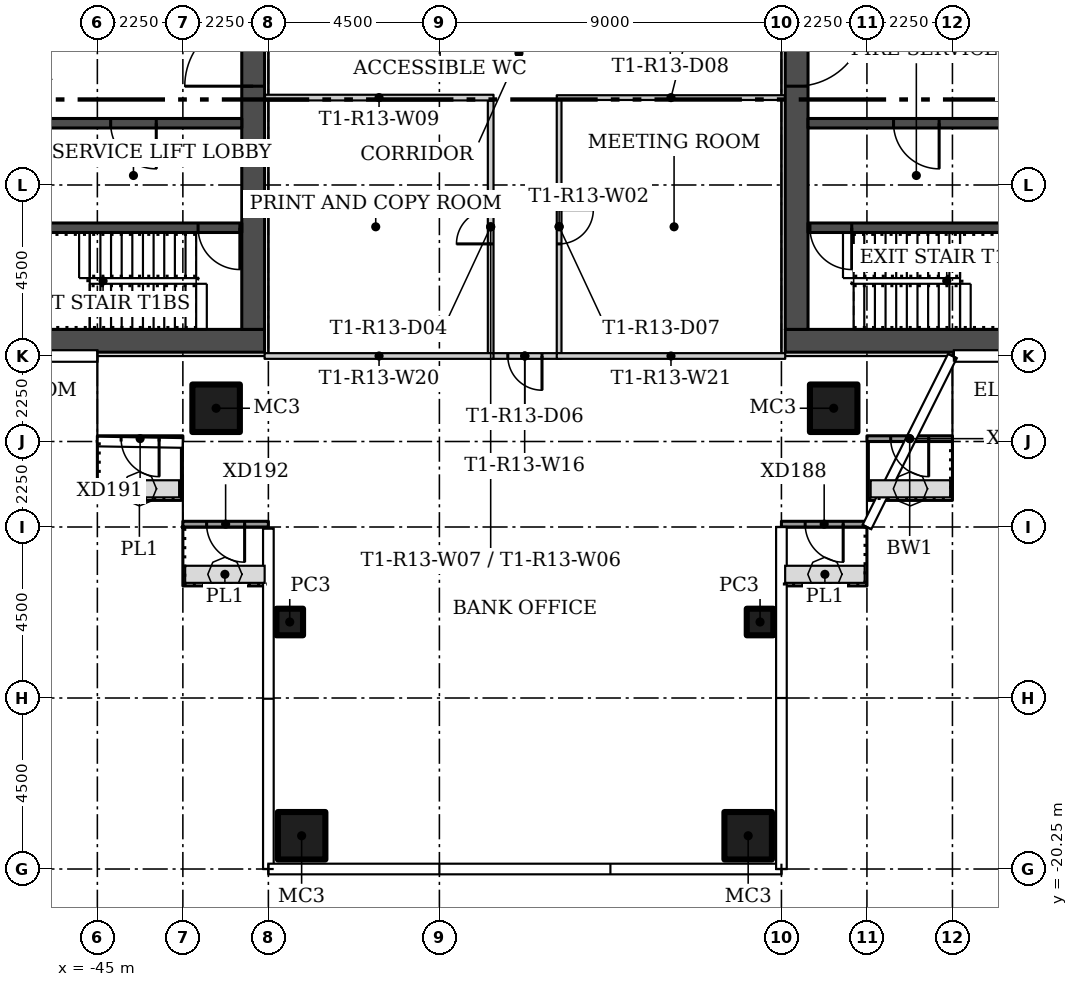
"""IFC4 building model, lengths in metres.
Left out: names, types, materials, properties, quantities, classifications, styles, units other than length and angle.
Written with IfcOpenShell. Run it as: python <this file> out.ifc"""

import sys

from ifc_helpers import new_model, si_unit, direction, frame, frame_2d, origin, origin_2d, place, context, subcontext, project, spatial, rectangle, hollow_rectangle, extrude, element, fill, save


model = new_model("IFC4")
c1 = context("Model", 3, precision=1e-05, world=origin(), true_north=direction((0.0, 1.0)))
c2 = subcontext(c1, "Body", "Model", "MODEL_VIEW")
j1 = project(units=[si_unit("LENGTHUNIT", "METRE"), si_unit("PLANEANGLEUNIT", "RADIAN")], contexts=[c1])
p1 = place(None, origin())
s1 = spatial("IfcSite", under=j1, at=p1, CompositionType="ELEMENT")
p2 = place(p1, origin())
s2 = spatial("IfcBuilding", under=s1, at=p2, CompositionType="ELEMENT")
p3 = place(p2, frame((0.0, 0.0, 124.8)))
s3 = spatial("IfcBuildingStorey", under=s2, at=p3, CompositionType="ELEMENT", Elevation=124.8)
for number, where in (
    (1, (-25.625, -8.125, 0.0)),
    (2, (-41.875, -8.125, 0.0)),
):
    element("IfcColumn", number, at=place(p3, frame(where)), inside=s3, PredefinedType="COLUMN", context=c2, shape_type="SweptSolid", body=[
        extrude(hollow_rectangle(XDim=1.25, YDim=1.25, WallThickness=0.05, at=origin_2d()), origin(), (0.0, 0.0, 1.0), 3.45),
    ])
p4 = place(p3, frame((-39.938, -13.75, 0.0)))
e3 = element("IfcColumn", 3, at=p4, inside=s3, PredefinedType="COLUMN", context=c2, shape_type="SweptSolid", body=[
    extrude(hollow_rectangle(XDim=0.7, YDim=0.7, WallThickness=0.025, at=origin_2d()), origin(), (0.0, 0.0, 1.0), 3.45),
])
p5 = place(p3, frame((-39.625, -19.375, 0.0)))
e4 = element("IfcColumn", 4, at=p5, inside=s3, PredefinedType="COLUMN", context=c2, shape_type="SweptSolid", body=[
    extrude(hollow_rectangle(XDim=1.25, YDim=1.25, WallThickness=0.05, at=origin_2d()), origin(), (0.0, 0.0, 1.0), 3.45),
])
p6 = place(p3, frame((-27.562, -13.75, 0.0)))
e5 = element("IfcColumn", 5, at=p6, inside=s3, PredefinedType="COLUMN", context=c2, shape_type="SweptSolid", body=[
    extrude(hollow_rectangle(XDim=0.7, YDim=0.7, WallThickness=0.025, at=origin_2d()), origin(), (0.0, 0.0, 1.0), 3.45),
])
p7 = place(p3, frame((-27.875, -19.375, 0.0)))
e6 = element("IfcColumn", 6, at=p7, inside=s3, PredefinedType="COLUMN", context=c2, shape_type="SweptSolid", body=[
    extrude(hollow_rectangle(XDim=1.25, YDim=1.25, WallThickness=0.05, at=origin_2d()), origin(), (0.0, 0.0, 1.0), 3.45),
])
p8 = place(p3, frame((-32.85, -0.013, 0.0), z_axis=(0.0, 0.0, 1.0), x_axis=(0.0, -1.0, 0.0)))
e7 = element("IfcWall", 7, at=p8, inside=s3, PredefinedType="PARTITIONING", context=c2, shape_type="SweptSolid", body=[
    extrude(rectangle(XDim=6.662, YDim=0.125, at=frame_2d((3.331, 0.0))), origin(), (0.0, 0.0, 1.0), 3.45),
])
p9 = place(p8, frame((2.887, 0.0, 0.0)))
e8 = element("IfcOpeningElement", 8, at=p9, cuts=e7, PredefinedType="OPENING", context=c2, shape_type="SweptSolid", body=[
    extrude(rectangle(XDim=0.9, YDim=2.1, at=frame_2d((0.45, 1.05))), frame((0.0, 0.073, 0.0), z_axis=(0.0, -1.0, 0.0), x_axis=(1.0, 0.0, 0.0)), (0.0, 0.0, 1.0), 0.145),
])
p10 = place(p3, frame((-26.9, 0.05, 0.0), z_axis=(0.0, 0.0, 1.0), x_axis=(-1.0, 0.0, 0.0)))
e9 = element("IfcWall", 9, at=p10, inside=s3, PredefinedType="PARTITIONING", context=c2, shape_type="SweptSolid", body=[
    extrude(rectangle(XDim=6.012, YDim=0.125, at=frame_2d((3.006, 0.0))), origin(), (0.0, 0.0, 1.0), 3.45),
])
p11 = place(p3, frame((-34.65, -6.675, 0.0), z_axis=(0.0, 0.0, 1.0), x_axis=(0.0, 1.0, 0.0)))
e10 = element("IfcWall", 10, at=p11, inside=s3, PredefinedType="PARTITIONING", context=c2, shape_type="SweptSolid", body=[
    extrude(rectangle(XDim=6.65, YDim=0.15, at=frame_2d((3.325, 0.0))), origin(), (0.0, 0.0, 1.0), 3.45),
])
p12 = place(p11, frame((2.875, 0.0, 0.0)))
e11 = element("IfcOpeningElement", 11, at=p12, cuts=e10, PredefinedType="OPENING", context=c2, shape_type="SweptSolid", body=[
    extrude(rectangle(XDim=0.9, YDim=2.1, at=frame_2d((0.45, 1.05))), frame((0.0, 0.085, 0.0), z_axis=(0.0, -1.0, 0.0), x_axis=(1.0, 0.0, 0.0)), (0.0, 0.0, 1.0), 0.17),
])
p13 = place(p3, frame((-34.575, 0.05, 0.0), z_axis=(0.0, 0.0, 1.0), x_axis=(-1.0, 0.0, 0.0)))
e12 = element("IfcWall", 12, at=p13, inside=s3, PredefinedType="PARTITIONING", context=c2, shape_type="SweptSolid", body=[
    extrude(rectangle(XDim=6.025, YDim=0.15, at=frame_2d((3.012, 0.0))), origin(), (0.0, 0.0, 1.0), 3.45),
])
p14 = place(p3, frame((-32.787, -6.75, 0.0), z_axis=(0.0, 0.0, 1.0), x_axis=(-1.0, 0.0, 0.0)))
e13 = element("IfcWall", 13, at=p14, inside=s3, PredefinedType="PARTITIONING", context=c2, shape_type="SweptSolid", body=[
    extrude(rectangle(XDim=1.938, YDim=0.15, at=frame_2d((0.969, 0.0))), origin(), (0.0, 0.0, 1.0), 3.45),
])
p15 = place(p14, frame((0.513, 0.0, 0.0)))
e14 = element("IfcOpeningElement", 14, at=p15, cuts=e13, PredefinedType="OPENING", context=c2, shape_type="SweptSolid", body=[
    extrude(rectangle(XDim=0.9, YDim=2.1, at=frame_2d((0.45, 1.05))), frame((0.0, 0.085, 0.0), z_axis=(0.0, -1.0, 0.0), x_axis=(1.0, 0.0, 0.0)), (0.0, 0.0, 1.0), 0.17),
])
p16 = place(p3, frame((-40.6, -6.75, 0.0)))
e15 = element("IfcWall", 15, at=p16, inside=s3, PredefinedType="PARTITIONING", context=c2, shape_type="SweptSolid", body=[
    extrude(rectangle(XDim=6.025, YDim=0.15, at=frame_2d((3.012, 0.0))), origin(), (0.0, 0.0, 1.0), 3.45),
])
p17 = place(p3, frame((-32.912, -6.75, 0.0)))
e16 = element("IfcWall", 16, at=p17, inside=s3, PredefinedType="PARTITIONING", context=c2, shape_type="SweptSolid", body=[
    extrude(rectangle(XDim=6.012, YDim=0.15, at=frame_2d((3.006, 0.0))), origin(), (0.0, 0.0, 1.0), 3.45),
])
p18 = place(p3, frame((-22.5, -8.925, 0.0), z_axis=(0.0, 0.0, 1.0), x_axis=(-1.0, 0.0, 0.0)))
e17 = element("IfcWall", 17, at=p18, inside=s3, PredefinedType="SOLIDWALL", context=c2, shape_type="SweptSolid", body=[
    extrude(rectangle(XDim=2.25, YDim=0.15, at=frame_2d((1.125, 0.0))), origin(), (0.0, 0.0, 1.0), 3.45),
])
p19 = place(p18, frame((0.625, 0.0, 0.0)))
e18 = element("IfcOpeningElement", 18, at=p19, cuts=e17, PredefinedType="OPENING", context=c2, shape_type="SweptSolid", body=[
    extrude(rectangle(XDim=1.0, YDim=2.4, at=frame_2d((0.5, 1.2))), frame((0.0, 0.085, 0.0), z_axis=(0.0, -1.0, 0.0), x_axis=(1.0, 0.0, 0.0)), (0.0, 0.0, 1.0), 0.17),
])
p20 = place(p3, frame((-24.75, -11.175, 0.0), z_axis=(0.0, 0.0, 1.0), x_axis=(-1.0, 0.0, 0.0)))
e19 = element("IfcWall", 19, at=p20, inside=s3, PredefinedType="SOLIDWALL", context=c2, shape_type="SweptSolid", body=[
    extrude(rectangle(XDim=2.25, YDim=0.15, at=frame_2d((1.125, 0.0))), origin(), (0.0, 0.0, 1.0), 3.45),
])
p21 = place(p20, frame((0.625, 0.0, 0.0)))
e20 = element("IfcOpeningElement", 20, at=p21, cuts=e19, PredefinedType="OPENING", context=c2, shape_type="SweptSolid", body=[
    extrude(rectangle(XDim=1.0, YDim=2.4, at=frame_2d((0.5, 1.2))), frame((0.0, 0.085, 0.0), z_axis=(0.0, -1.0, 0.0), x_axis=(1.0, 0.0, 0.0)), (0.0, 0.0, 1.0), 0.17),
])
p22 = place(p3, frame((-42.75, -8.925, 0.0), z_axis=(0.0, 0.0, 1.0), x_axis=(-1.0, 0.0, 0.0)))
e21 = element("IfcWall", 21, at=p22, inside=s3, PredefinedType="SOLIDWALL", context=c2, shape_type="SweptSolid", body=[
    extrude(rectangle(XDim=2.25, YDim=0.15, at=frame_2d((1.125, 0.0))), origin(), (0.0, 0.0, 1.0), 3.45),
])
p23 = place(p22, frame((0.625, 0.0, 0.0)))
e22 = element("IfcOpeningElement", 22, at=p23, cuts=e21, PredefinedType="OPENING", context=c2, shape_type="SweptSolid", body=[
    extrude(rectangle(XDim=1.0, YDim=2.4, at=frame_2d((0.5, 1.2))), frame((0.0, 0.085, 0.0), z_axis=(0.0, -1.0, 0.0), x_axis=(1.0, 0.0, 0.0)), (0.0, 0.0, 1.0), 0.17),
])
p24 = place(p3, frame((-40.5, -11.175, 0.0), z_axis=(0.0, 0.0, 1.0), x_axis=(-1.0, 0.0, 0.0)))
e23 = element("IfcWall", 23, at=p24, inside=s3, PredefinedType="SOLIDWALL", context=c2, shape_type="SweptSolid", body=[
    extrude(rectangle(XDim=2.25, YDim=0.15, at=frame_2d((1.125, 0.0))), origin(), (0.0, 0.0, 1.0), 3.45),
])
p25 = place(p24, frame((0.625, 0.0, 0.0)))
e24 = element("IfcOpeningElement", 24, at=p25, cuts=e23, PredefinedType="OPENING", context=c2, shape_type="SweptSolid", body=[
    extrude(rectangle(XDim=1.0, YDim=2.4, at=frame_2d((0.5, 1.2))), frame((0.0, 0.085, 0.0), z_axis=(0.0, -1.0, 0.0), x_axis=(1.0, 0.0, 0.0)), (0.0, 0.0, 1.0), 0.17),
])
p26 = place(p3, frame((-26.9, -6.35, 0.0)))
e25 = element("IfcWall", 25, at=p26, inside=s3, PredefinedType="SHEAR", context=c2, shape_type="SweptSolid", body=[
    extrude(rectangle(XDim=13.3, YDim=0.6, at=frame_2d((6.65, 0.0))), origin(), (0.0, 0.0, 1.0), 3.45),
])
p27 = place(p3, frame((-26.6, 6.05, 0.0), z_axis=(0.0, 0.0, 1.0), x_axis=(0.0, -1.0, 0.0)))
e26 = element("IfcWall", 26, at=p27, inside=s3, PredefinedType="SHEAR", context=c2, shape_type="SweptSolid", body=[
    extrude(rectangle(XDim=12.1, YDim=0.6, at=frame_2d((6.05, 0.0))), origin(), (0.0, 0.0, 1.0), 3.45),
])
p28 = place(p27, frame((3.9, 0.0, 0.0)))
e27 = element("IfcOpeningElement", 27, at=p28, cuts=e26, PredefinedType="OPENING", context=c2, shape_type="SweptSolid", body=[
    extrude(rectangle(XDim=1.8, YDim=2.4, at=frame_2d((0.9, 1.2))), frame((0.0, 0.31, 0.0), z_axis=(0.0, -1.0, 0.0), x_axis=(1.0, 0.0, 0.0)), (0.0, 0.0, 1.0), 0.62),
])
p29 = place(p3, frame((-14.2, -3.375, 0.0), z_axis=(0.0, 0.0, 1.0), x_axis=(-1.0, 0.0, 0.0)))
e28 = element("IfcWall", 28, at=p29, inside=s3, PredefinedType="SHEAR", context=c2, shape_type="SweptSolid", body=[
    extrude(rectangle(XDim=12.1, YDim=0.25, at=frame_2d((6.05, 0.0))), origin(), (0.0, 0.0, 1.0), 3.45),
])
p30 = place(p29, frame((10.95, 0.0, 0.0)))
e29 = element("IfcOpeningElement", 29, at=p30, cuts=e28, PredefinedType="OPENING", context=c2, shape_type="SweptSolid", body=[
    extrude(rectangle(XDim=1.1, YDim=2.1, at=frame_2d((0.55, 1.05))), frame((0.0, 0.135, 0.0), z_axis=(0.0, -1.0, 0.0), x_axis=(1.0, 0.0, 0.0)), (0.0, 0.0, 1.0), 0.27),
])
p31 = place(p3, frame((-14.2, -0.625, 0.0), z_axis=(0.0, 0.0, 1.0), x_axis=(-1.0, 0.0, 0.0)))
e30 = element("IfcWall", 30, at=p31, inside=s3, PredefinedType="SHEAR", context=c2, shape_type="SweptSolid", body=[
    extrude(rectangle(XDim=12.1, YDim=0.25, at=frame_2d((6.05, 0.0))), origin(), (0.0, 0.0, 1.0), 3.45),
])
p32 = place(p31, frame((8.65, 0.0, 0.0)))
e31 = element("IfcOpeningElement", 31, at=p32, cuts=e30, PredefinedType="OPENING", context=c2, shape_type="SweptSolid", body=[
    extrude(rectangle(XDim=1.2, YDim=2.1, at=frame_2d((0.6, 1.05))), frame((0.0, 0.135, 0.0), z_axis=(0.0, -1.0, 0.0), x_axis=(1.0, 0.0, 0.0)), (0.0, 0.0, 1.0), 0.27),
])
p33 = place(p31, frame((1.175, 0.0, 0.0)))
e32 = element("IfcOpeningElement", 32, at=p33, cuts=e30, PredefinedType="OPENING", context=c2, shape_type="SweptSolid", body=[
    extrude(rectangle(XDim=0.9, YDim=2.1, at=frame_2d((0.45, 1.05))), frame((0.0, 0.135, 0.0), z_axis=(0.0, -1.0, 0.0), x_axis=(1.0, 0.0, 0.0)), (0.0, 0.0, 1.0), 0.27),
])
p34 = place(p3, frame((-40.6, -6.35, 0.0), z_axis=(0.0, 0.0, 1.0), x_axis=(-1.0, 0.0, 0.0)))
e33 = element("IfcWall", 33, at=p34, inside=s3, PredefinedType="SHEAR", context=c2, shape_type="SweptSolid", body=[
    extrude(rectangle(XDim=13.3, YDim=0.6, at=frame_2d((6.65, 0.0))), origin(), (0.0, 0.0, 1.0), 3.45),
])
p35 = place(p3, frame((-40.9, -6.05, 0.0), z_axis=(0.0, 0.0, 1.0), x_axis=(0.0, 1.0, 0.0)))
e34 = element("IfcWall", 34, at=p35, inside=s3, PredefinedType="SHEAR", context=c2, shape_type="SweptSolid", body=[
    extrude(rectangle(XDim=12.1, YDim=0.6, at=frame_2d((6.05, 0.0))), origin(), (0.0, 0.0, 1.0), 3.45),
])
p36 = place(p35, frame((6.4, 0.0, 0.0)))
e35 = element("IfcOpeningElement", 35, at=p36, cuts=e34, PredefinedType="OPENING", context=c2, shape_type="SweptSolid", body=[
    extrude(rectangle(XDim=1.8, YDim=2.4, at=frame_2d((0.9, 1.2))), frame((0.0, 0.31, 0.0), z_axis=(0.0, -1.0, 0.0), x_axis=(1.0, 0.0, 0.0)), (0.0, 0.0, 1.0), 0.62),
])
p37 = place(p3, frame((-41.2, -3.375, 0.0), z_axis=(0.0, 0.0, 1.0), x_axis=(-1.0, 0.0, 0.0)))
e36 = element("IfcWall", 36, at=p37, inside=s3, PredefinedType="SHEAR", context=c2, shape_type="SweptSolid", body=[
    extrude(rectangle(XDim=12.1, YDim=0.25, at=frame_2d((6.05, 0.0))), origin(), (0.0, 0.0, 1.0), 3.45),
])
p38 = place(p37, frame((0.05, 0.0, 0.0)))
e37 = element("IfcOpeningElement", 37, at=p38, cuts=e36, PredefinedType="OPENING", context=c2, shape_type="SweptSolid", body=[
    extrude(rectangle(XDim=1.1, YDim=2.1, at=frame_2d((0.55, 1.05))), frame((0.0, 0.135, 0.0), z_axis=(0.0, -1.0, 0.0), x_axis=(1.0, 0.0, 0.0)), (0.0, 0.0, 1.0), 0.27),
])
p39 = place(p3, frame((-41.2, -0.625, 0.0), z_axis=(0.0, 0.0, 1.0), x_axis=(-1.0, 0.0, 0.0)))
e38 = element("IfcWall", 38, at=p39, inside=s3, PredefinedType="SHEAR", context=c2, shape_type="SweptSolid", body=[
    extrude(rectangle(XDim=12.1, YDim=0.25, at=frame_2d((6.05, 0.0))), origin(), (0.0, 0.0, 1.0), 3.45),
])
p40 = place(p39, frame((2.25, 0.0, 0.0)))
e39 = element("IfcOpeningElement", 39, at=p40, cuts=e38, PredefinedType="OPENING", context=c2, shape_type="SweptSolid", body=[
    extrude(rectangle(XDim=1.2, YDim=2.1, at=frame_2d((0.6, 1.05))), frame((0.0, 0.135, 0.0), z_axis=(0.0, -1.0, 0.0), x_axis=(1.0, 0.0, 0.0)), (0.0, 0.0, 1.0), 0.27),
])
p41 = place(p39, frame((9.5, 0.0, 0.0)))
e40 = element("IfcOpeningElement", 40, at=p41, cuts=e38, PredefinedType="OPENING", context=c2, shape_type="SweptSolid", body=[
    extrude(rectangle(XDim=0.9, YDim=2.1, at=frame_2d((0.45, 1.05))), frame((0.0, 0.135, 0.0), z_axis=(0.0, -1.0, 0.0), x_axis=(1.0, 0.0, 0.0)), (0.0, 0.0, 1.0), 0.27),
])
p42 = place(p39, frame((11.125, 0.0, 0.0)))
e41 = element("IfcOpeningElement", 41, at=p42, cuts=e38, PredefinedType="OPENING", context=c2, shape_type="SweptSolid", body=[
    extrude(rectangle(XDim=0.9, YDim=2.1, at=frame_2d((0.45, 1.05))), frame((0.0, 0.135, 0.0), z_axis=(0.0, -1.0, 0.0), x_axis=(1.0, 0.0, 0.0)), (0.0, 0.0, 1.0), 0.27),
])
p43 = place(p12, origin())
e42 = element("IfcDoor", 42, at=p43, inside=s3, OperationType="SINGLE_SWING_RIGHT", PredefinedType="DOOR", context=c2, shape_type="SweptSolid", body=[
    extrude(rectangle(XDim=0.9, YDim=2.1, at=frame_2d((0.45, 1.05))), frame((0.0, 0.025, 0.0), z_axis=(0.0, -1.0, 0.0), x_axis=(1.0, 0.0, 0.0)), (0.0, 0.0, 1.0), 0.05),
])
fill(e11, e42)
p44 = place(p15, origin())
e43 = element("IfcDoor", 43, at=p44, inside=s3, OperationType="SINGLE_SWING_RIGHT", PredefinedType="DOOR", context=c2, shape_type="SweptSolid", body=[
    extrude(rectangle(XDim=0.9, YDim=2.1, at=frame_2d((0.45, 1.05))), frame((0.0, 0.025, 0.0), z_axis=(0.0, -1.0, 0.0), x_axis=(1.0, 0.0, 0.0)), (0.0, 0.0, 1.0), 0.05),
])
fill(e14, e43)
p45 = place(p9, origin())
e44 = element("IfcDoor", 44, at=p45, inside=s3, OperationType="SINGLE_SWING_LEFT", PredefinedType="DOOR", context=c2, shape_type="SweptSolid", body=[
    extrude(rectangle(XDim=0.9, YDim=2.1, at=frame_2d((0.45, 1.05))), frame((0.0, 0.025, 0.0), z_axis=(0.0, -1.0, 0.0), x_axis=(1.0, 0.0, 0.0)), (0.0, 0.0, 1.0), 0.05),
])
fill(e8, e44)
p46 = place(p19, origin())
e45 = element("IfcDoor", 45, at=p46, inside=s3, OperationType="SINGLE_SWING_RIGHT", PredefinedType="DOOR", context=c2, shape_type="SweptSolid", body=[
    extrude(rectangle(XDim=1.0, YDim=2.4, at=frame_2d((0.5, 1.2))), frame((0.0, 0.025, 0.0), z_axis=(0.0, -1.0, 0.0), x_axis=(1.0, 0.0, 0.0)), (0.0, 0.0, 1.0), 0.05),
])
fill(e18, e45)
p47 = place(p21, origin())
e46 = element("IfcDoor", 46, at=p47, inside=s3, OperationType="SINGLE_SWING_LEFT", PredefinedType="DOOR", context=c2, shape_type="SweptSolid", body=[
    extrude(rectangle(XDim=1.0, YDim=2.4, at=frame_2d((0.5, 1.2))), frame((0.0, 0.025, 0.0), z_axis=(0.0, -1.0, 0.0), x_axis=(1.0, 0.0, 0.0)), (0.0, 0.0, 1.0), 0.05),
])
fill(e20, e46)
p48 = place(p23, origin())
e47 = element("IfcDoor", 47, at=p48, inside=s3, OperationType="SINGLE_SWING_LEFT", PredefinedType="DOOR", context=c2, shape_type="SweptSolid", body=[
    extrude(rectangle(XDim=1.0, YDim=2.4, at=frame_2d((0.5, 1.2))), frame((0.0, 0.025, 0.0), z_axis=(0.0, -1.0, 0.0), x_axis=(1.0, 0.0, 0.0)), (0.0, 0.0, 1.0), 0.05),
])
fill(e22, e47)
p49 = place(p25, origin())
e48 = element("IfcDoor", 48, at=p49, inside=s3, OperationType="SINGLE_SWING_RIGHT", PredefinedType="DOOR", context=c2, shape_type="SweptSolid", body=[
    extrude(rectangle(XDim=1.0, YDim=2.4, at=frame_2d((0.5, 1.2))), frame((0.0, 0.025, 0.0), z_axis=(0.0, -1.0, 0.0), x_axis=(1.0, 0.0, 0.0)), (0.0, 0.0, 1.0), 0.05),
])
fill(e24, e48)
p50 = place(p28, origin())
e49 = element("IfcDoor", 49, at=p50, inside=s3, OperationType="DOUBLE_DOOR_SINGLE_SWING", PredefinedType="DOOR", context=c2, shape_type="SweptSolid", body=[
    extrude(rectangle(XDim=1.8, YDim=2.4, at=frame_2d((0.9, 1.2))), frame((0.0, 0.025, 0.0), z_axis=(0.0, -1.0, 0.0), x_axis=(1.0, 0.0, 0.0)), (0.0, 0.0, 1.0), 0.05),
])
fill(e27, e49)
p51 = place(p30, origin())
e50 = element("IfcDoor", 50, at=p51, inside=s3, OperationType="SINGLE_SWING_RIGHT", PredefinedType="DOOR", context=c2, shape_type="SweptSolid", body=[
    extrude(rectangle(XDim=1.1, YDim=2.1, at=frame_2d((0.55, 1.05))), frame((0.0, 0.025, 0.0), z_axis=(0.0, -1.0, 0.0), x_axis=(1.0, 0.0, 0.0)), (0.0, 0.0, 1.0), 0.05),
])
fill(e29, e50)
p52 = place(p32, origin())
e51 = element("IfcDoor", 51, at=p52, inside=s3, OperationType="SINGLE_SWING_RIGHT", PredefinedType="DOOR", context=c2, shape_type="SweptSolid", body=[
    extrude(rectangle(XDim=1.2, YDim=2.1, at=frame_2d((0.6, 1.05))), frame((0.0, 0.025, 0.0), z_axis=(0.0, -1.0, 0.0), x_axis=(1.0, 0.0, 0.0)), (0.0, 0.0, 1.0), 0.05),
])
fill(e31, e51)
p53 = place(p36, origin())
e52 = element("IfcDoor", 52, at=p53, inside=s3, OperationType="DOUBLE_DOOR_SINGLE_SWING", PredefinedType="DOOR", context=c2, shape_type="SweptSolid", body=[
    extrude(rectangle(XDim=1.8, YDim=2.4, at=frame_2d((0.9, 1.2))), frame((0.0, 0.025, 0.0), z_axis=(0.0, -1.0, 0.0), x_axis=(1.0, 0.0, 0.0)), (0.0, 0.0, 1.0), 0.05),
])
fill(e35, e52)
p54 = place(p38, origin())
e53 = element("IfcDoor", 53, at=p54, inside=s3, OperationType="SINGLE_SWING_LEFT", PredefinedType="DOOR", context=c2, shape_type="SweptSolid", body=[
    extrude(rectangle(XDim=1.1, YDim=2.1, at=frame_2d((0.55, 1.05))), frame((0.0, 0.025, 0.0), z_axis=(0.0, -1.0, 0.0), x_axis=(1.0, 0.0, 0.0)), (0.0, 0.0, 1.0), 0.05),
])
fill(e37, e53)
p55 = place(p40, origin())
e54 = element("IfcDoor", 54, at=p55, inside=s3, OperationType="SINGLE_SWING_LEFT", PredefinedType="DOOR", context=c2, shape_type="SweptSolid", body=[
    extrude(rectangle(XDim=1.2, YDim=2.1, at=frame_2d((0.6, 1.05))), frame((0.0, 0.025, 0.0), z_axis=(0.0, -1.0, 0.0), x_axis=(1.0, 0.0, 0.0)), (0.0, 0.0, 1.0), 0.05),
])
fill(e39, e54)
save(model, sys.argv[1])
